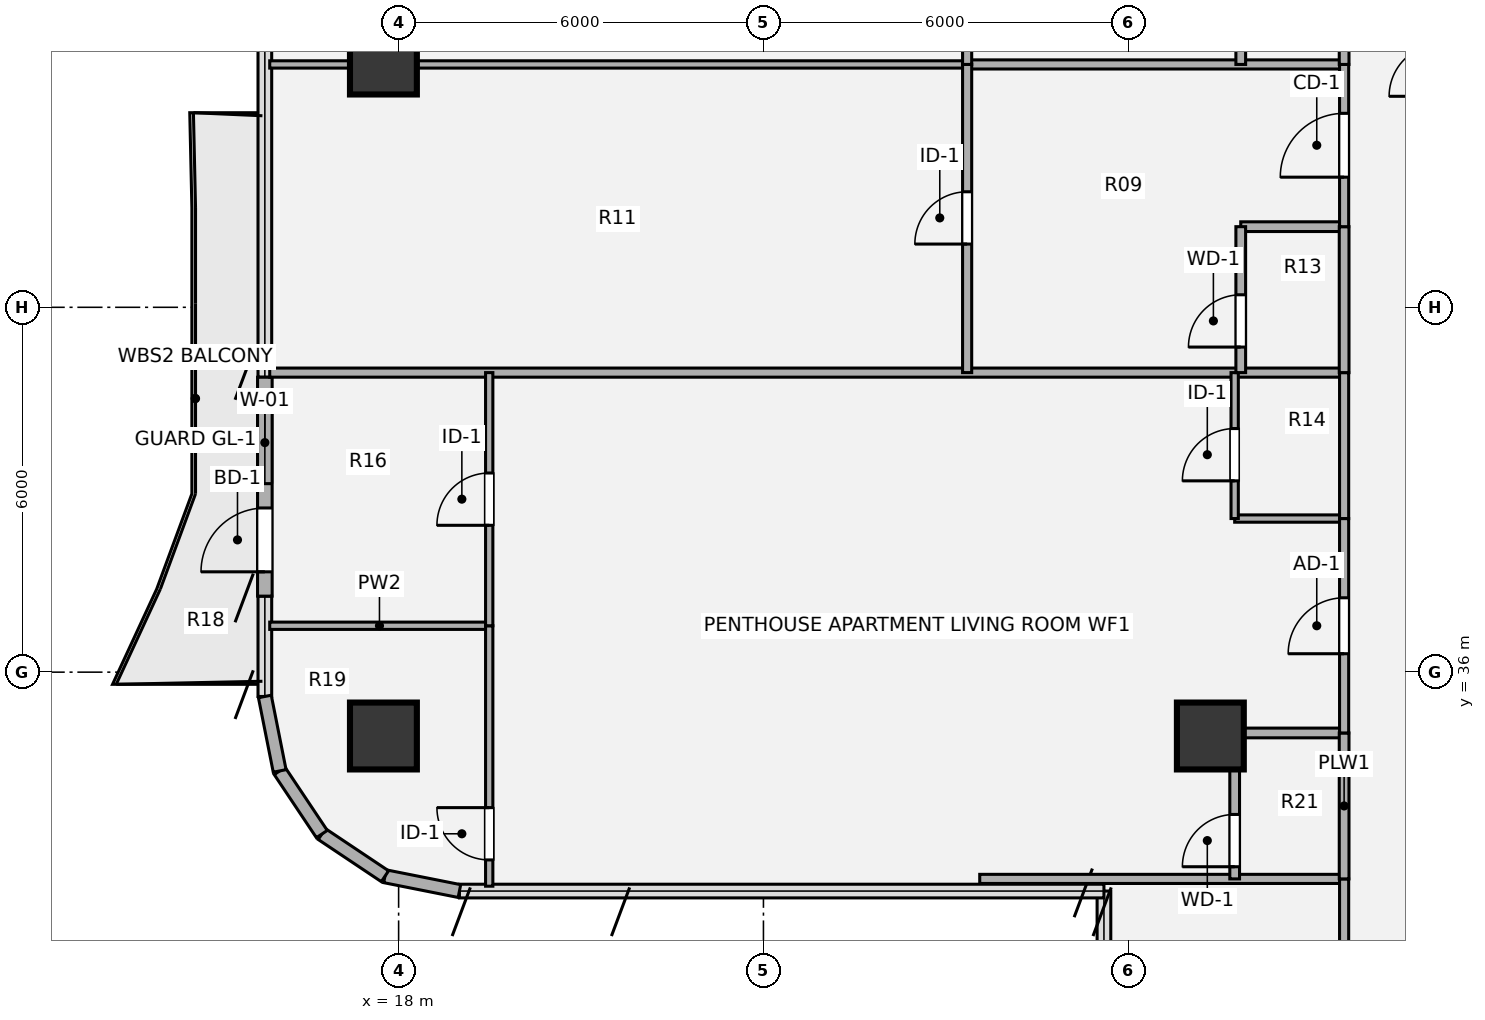
"""IFC4 building model, lengths in metres.
Left out: names, types, materials, properties, quantities, classifications, styles, units other than length and angle.
Written with IfcOpenShell. Run it as: python <this file> out.ifc"""

import sys

from ifc_helpers import new_model, si_unit, direction, frame, frame_2d, origin, origin_2d, place, context, subcontext, project, spatial, rectangle, hollow_circle, extrude, source, transform, mapped, element, fill, save


model = new_model("IFC4")
c1 = context("Model", 3, precision=1e-05, world=origin(), true_north=direction((0.0, 1.0)))
c2 = subcontext(c1, "Body", "Model", "MODEL_VIEW")
j1 = project(units=[si_unit("LENGTHUNIT", "METRE"), si_unit("PLANEANGLEUNIT", "RADIAN")], contexts=[c1])
p1 = place(None, origin())
s1 = spatial("IfcSite", under=j1, at=p1, CompositionType="ELEMENT")
p2 = place(p1, origin())
s2 = spatial("IfcBuilding", under=s1, at=p2, CompositionType="ELEMENT")
p3 = place(p2, frame((0.0, 0.0, 205.56)))
s3 = spatial("IfcBuildingStorey", under=s2, at=p3, CompositionType="ELEMENT", Elevation=205.56)
m1 = source(origin(), c2, "Body", "SweptSolid", [
    extrude(hollow_circle(Radius=0.55, WallThickness=0.04, at=origin_2d()), origin(), (0.0, 0.0, 1.0), 3.78),
])
for number, where, z_axis, x_axis in (
    (1, (17.75, 34.95, 0.0), (0.0, 0.0, 1.0), (1.0, 0.0, 0.0)),
    (2, (17.75, 46.05, 0.0), (0.0, 0.0, 1.0), (1.0, 0.0, 0.0)),
    (3, (31.35, 34.95, 0.0), (0.0, 0.0, 1.0), (1.0, 0.0, 0.0)),
):
    element("IfcColumn", number, at=place(p3, frame(where, z_axis=z_axis, x_axis=x_axis)), inside=s3, PredefinedType="COLUMN", context=c2, shape_type="MappedRepresentation", body=[
        mapped(m1, transform((0.0, 0.0, 0.0), x_axis=(1.0, 0.0, 0.0), y_axis=(0.0, 1.0, 0.0), z_axis=(0.0, 0.0, 1.0), scale=1.0)),
    ])
for number, where, z_axis, x_axis in (
    (4, (19.0, 32.4, 0.0), (0.0, 0.0, 1.0), (-0.981, 0.195, 0.0)),
    (5, (17.775, 32.644, 0.0), (0.0, 0.0, 1.0), (-0.831, 0.556, 0.0)),
    (6, (16.737, 33.337, 0.0), (0.0, 0.0, 1.0), (-0.556, 0.831, 0.0)),
    (7, (16.044, 34.375, 0.0), (0.0, 0.0, 1.0), (-0.195, 0.981, 0.0)),
):
    element("IfcWall", number, at=place(p3, frame(where, z_axis=z_axis, x_axis=x_axis)), inside=s3, PredefinedType="SOLIDWALL", context=c2, shape_type="SweptSolid", body=[
        extrude(rectangle(XDim=1.249, YDim=0.215, at=frame_2d((0.624, 0.0))), origin(), (0.0, 0.0, 1.0), 3.53),
    ])
p4 = place(p3, frame((15.8, 37.25, 0.0), z_axis=(0.0, 0.0, 1.0), x_axis=(0.0, 1.0, 0.0)))
e8 = element("IfcWall", 8, at=p4, inside=s3, PredefinedType="SOLIDWALL", context=c2, shape_type="SweptSolid", body=[
    extrude(rectangle(XDim=3.6, YDim=0.24, at=frame_2d((1.8, 0.0))), origin(), (0.0, 0.0, 1.0), 3.53),
])
p5 = place(p4, frame((0.4, 0.0, 0.0)))
e9 = element("IfcOpeningElement", 9, at=p5, cuts=e8, PredefinedType="OPENING", context=c2, shape_type="SweptSolid", body=[
    extrude(rectangle(XDim=1.05, YDim=2.15, at=origin_2d()), frame((0.525, 0.13, 1.075), z_axis=(0.0, -1.0, 0.0), x_axis=(1.0, 0.0, 0.0)), (0.0, 0.0, 1.0), 0.26),
])
p6 = place(p4, frame((1.85, 0.0, 0.85)))
e10 = element("IfcOpeningElement", 10, at=p6, cuts=e8, PredefinedType="OPENING", context=c2, shape_type="SweptSolid", body=[
    extrude(rectangle(XDim=1.35, YDim=1.35, at=origin_2d()), frame((0.675, 0.13, 0.675), z_axis=(0.0, -1.0, 0.0), x_axis=(1.0, 0.0, 0.0)), (0.0, 0.0, 1.0), 0.26),
])
p7 = place(p3, frame((27.557, 32.6, 0.0), z_axis=(0.0, 0.0, 1.0), x_axis=(1.0, 0.0, 0.0)))
e11 = element("IfcWall", 11, at=p7, inside=s3, PredefinedType="PARTITIONING", context=c2, shape_type="SweptSolid", body=[
    extrude(rectangle(XDim=5.993, YDim=0.15, at=frame_2d((2.997, 0.0))), origin(), (0.0, 0.0, 1.0), 3.5),
])
p8 = place(p3, frame((31.75, 35.0, 0.0), z_axis=(0.0, 0.0, 1.0), x_axis=(1.0, 0.0, 0.0)))
e12 = element("IfcWall", 12, at=p8, inside=s3, PredefinedType="PLUMBINGWALL", context=c2, shape_type="SweptSolid", body=[
    extrude(rectangle(XDim=1.8, YDim=0.16, at=frame_2d((0.9, 0.0))), origin(), (0.0, 0.0, 1.0), 2.903),
])
p9 = place(p3, frame((15.88, 36.763, 0.0), z_axis=(0.0, 0.0, 1.0), x_axis=(1.0, 0.0, 0.0)))
e13 = element("IfcWall", 13, at=p9, inside=s3, PredefinedType="PARTITIONING", context=c2, shape_type="SweptSolid", body=[
    extrude(rectangle(XDim=3.61, YDim=0.12, at=frame_2d((1.805, 0.0))), origin(), (0.0, 0.0, 1.0), 2.982),
])
p10 = place(p3, frame((31.75, 38.526, 0.0), z_axis=(0.0, 0.0, 1.0), x_axis=(1.0, 0.0, 0.0)))
e14 = element("IfcWall", 14, at=p10, inside=s3, PredefinedType="PARTITIONING", context=c2, shape_type="SweptSolid", body=[
    extrude(rectangle(XDim=1.8, YDim=0.12, at=frame_2d((0.9, 0.0))), origin(), (0.0, 0.0, 1.0), 3.259),
])
p11 = place(p3, frame((15.88, 40.926, 0.0), z_axis=(0.0, 0.0, 1.0), x_axis=(1.0, 0.0, 0.0)))
e15 = element("IfcWall", 15, at=p11, inside=s3, PredefinedType="PARTITIONING", context=c2, shape_type="SweptSolid", body=[
    extrude(rectangle(XDim=17.67, YDim=0.15, at=frame_2d((8.835, 0.0))), origin(), (0.0, 0.0, 1.0), 2.982),
])
p12 = place(p3, frame((31.85, 43.326, 0.0), z_axis=(0.0, 0.0, 1.0), x_axis=(1.0, 0.0, 0.0)))
e16 = element("IfcWall", 16, at=p12, inside=s3, PredefinedType="PLUMBINGWALL", context=c2, shape_type="SweptSolid", body=[
    extrude(rectangle(XDim=1.7, YDim=0.16, at=frame_2d((0.85, 0.0))), origin(), (0.0, 0.0, 1.0), 3.259),
])
p13 = place(p3, frame((15.88, 45.994, 0.0), z_axis=(0.0, 0.0, 1.0), x_axis=(1.0, 0.0, 0.0)))
e17 = element("IfcWall", 17, at=p13, inside=s3, PredefinedType="PARTITIONING", context=c2, shape_type="SweptSolid", body=[
    extrude(rectangle(XDim=11.47, YDim=0.12, at=frame_2d((5.735, 0.0))), origin(), (0.0, 0.0, 1.0), 2.903),
])
p14 = place(p3, frame((27.35, 45.994, 0.0), z_axis=(0.0, 0.0, 1.0), x_axis=(1.0, 0.0, 0.0)))
e18 = element("IfcWall", 18, at=p14, inside=s3, PredefinedType="PARTITIONING", context=c2, shape_type="SweptSolid", body=[
    extrude(rectangle(XDim=6.2, YDim=0.15, at=frame_2d((3.1, 0.0))), origin(), (0.0, 0.0, 1.0), 2.903),
])
p15 = place(p3, frame((19.49, 32.48, 0.0), z_axis=(0.0, 0.0, 1.0), x_axis=(0.0, 1.0, 0.0)))
e19 = element("IfcWall", 19, at=p15, inside=s3, PredefinedType="PARTITIONING", context=c2, shape_type="SweptSolid", body=[
    extrude(rectangle(XDim=4.283, YDim=0.12, at=frame_2d((2.142, 0.0))), origin(), (0.0, 0.0, 1.0), 3.5),
])
p16 = place(p15, frame((0.432, 0.0, 0.0)))
e20 = element("IfcOpeningElement", 20, at=p16, cuts=e19, PredefinedType="OPENING", context=c2, shape_type="SweptSolid", body=[
    extrude(rectangle(XDim=0.86, YDim=2.1, at=origin_2d()), frame((0.43, 0.07, 1.05), z_axis=(0.0, -1.0, 0.0), x_axis=(1.0, 0.0, 0.0)), (0.0, 0.0, 1.0), 0.14),
])
p17 = place(p3, frame((19.49, 36.763, 0.0), z_axis=(0.0, 0.0, 1.0), x_axis=(0.0, 1.0, 0.0)))
e21 = element("IfcWall", 21, at=p17, inside=s3, PredefinedType="PARTITIONING", context=c2, shape_type="SweptSolid", body=[
    extrude(rectangle(XDim=4.163, YDim=0.12, at=frame_2d((2.082, 0.0))), origin(), (0.0, 0.0, 1.0), 3.5),
])
p18 = place(p17, frame((1.652, 0.0, 0.0)))
e22 = element("IfcOpeningElement", 22, at=p18, cuts=e21, PredefinedType="OPENING", context=c2, shape_type="SweptSolid", body=[
    extrude(rectangle(XDim=0.86, YDim=2.1, at=origin_2d()), frame((0.43, 0.07, 1.05), z_axis=(0.0, -1.0, 0.0), x_axis=(1.0, 0.0, 0.0)), (0.0, 0.0, 1.0), 0.14),
])
p19 = place(p3, frame((27.35, 40.926, 0.0), z_axis=(0.0, 0.0, 1.0), x_axis=(0.0, 1.0, 0.0)))
e23 = element("IfcWall", 23, at=p19, inside=s3, PredefinedType="PARTITIONING", context=c2, shape_type="SweptSolid", body=[
    extrude(rectangle(XDim=5.068, YDim=0.15, at=frame_2d((2.534, 0.0))), origin(), (0.0, 0.0, 1.0), 3.5),
])
p20 = place(p19, frame((2.114, 0.0, 0.0)))
e24 = element("IfcOpeningElement", 24, at=p20, cuts=e23, PredefinedType="OPENING", context=c2, shape_type="SweptSolid", body=[
    extrude(rectangle(XDim=0.86, YDim=2.1, at=origin_2d()), frame((0.43, 0.085, 1.05), z_axis=(0.0, -1.0, 0.0), x_axis=(1.0, 0.0, 0.0)), (0.0, 0.0, 1.0), 0.17),
])
p21 = place(p3, frame((27.35, 45.994, 0.0), z_axis=(0.0, 0.0, 1.0), x_axis=(0.0, 1.0, 0.0)))
e25 = element("IfcWall", 25, at=p21, inside=s3, PredefinedType="PARTITIONING", context=c2, shape_type="SweptSolid", body=[
    extrude(rectangle(XDim=4.706, YDim=0.15, at=frame_2d((2.353, 0.0))), origin(), (0.0, 0.0, 1.0), 3.5),
])
p22 = place(p21, frame((1.546, 0.0, 0.0)))
e26 = element("IfcOpeningElement", 26, at=p22, cuts=e25, PredefinedType="OPENING", context=c2, shape_type="SweptSolid", body=[
    extrude(rectangle(XDim=0.86, YDim=2.1, at=origin_2d()), frame((0.43, 0.085, 1.05), z_axis=(0.0, -1.0, 0.0), x_axis=(1.0, 0.0, 0.0)), (0.0, 0.0, 1.0), 0.17),
])
p23 = place(p3, frame((31.75, 32.6, 0.0), z_axis=(0.0, 0.0, 1.0), x_axis=(0.0, 1.0, 0.0)))
e27 = element("IfcWall", 27, at=p23, inside=s3, PredefinedType="PLUMBINGWALL", context=c2, shape_type="SweptSolid", body=[
    extrude(rectangle(XDim=2.4, YDim=0.16, at=frame_2d((1.2, 0.0))), origin(), (0.0, 0.0, 1.0), 3.5),
])
p24 = place(p23, frame((0.2, 0.0, 0.0)))
e28 = element("IfcOpeningElement", 28, at=p24, cuts=e27, PredefinedType="OPENING", context=c2, shape_type="SweptSolid", body=[
    extrude(rectangle(XDim=0.86, YDim=2.1, at=origin_2d()), frame((0.43, 0.09, 1.05), z_axis=(0.0, -1.0, 0.0), x_axis=(1.0, 0.0, 0.0)), (0.0, 0.0, 1.0), 0.18),
])
p25 = place(p3, frame((31.75, 38.526, 0.0), z_axis=(0.0, 0.0, 1.0), x_axis=(0.0, 1.0, 0.0)))
e29 = element("IfcWall", 29, at=p25, inside=s3, PredefinedType="PARTITIONING", context=c2, shape_type="SweptSolid", body=[
    extrude(rectangle(XDim=2.4, YDim=0.12, at=frame_2d((1.2, 0.0))), origin(), (0.0, 0.0, 1.0), 3.5),
])
p26 = place(p25, frame((0.62, 0.0, 0.0)))
e30 = element("IfcOpeningElement", 30, at=p26, cuts=e29, PredefinedType="OPENING", context=c2, shape_type="SweptSolid", body=[
    extrude(rectangle(XDim=0.86, YDim=2.1, at=origin_2d()), frame((0.43, 0.07, 1.05), z_axis=(0.0, -1.0, 0.0), x_axis=(1.0, 0.0, 0.0)), (0.0, 0.0, 1.0), 0.14),
])
p27 = place(p3, frame((31.85, 40.926, 0.0), z_axis=(0.0, 0.0, 1.0), x_axis=(0.0, 1.0, 0.0)))
e31 = element("IfcWall", 31, at=p27, inside=s3, PredefinedType="PLUMBINGWALL", context=c2, shape_type="SweptSolid", body=[
    extrude(rectangle(XDim=2.4, YDim=0.16, at=frame_2d((1.2, 0.0))), origin(), (0.0, 0.0, 1.0), 3.5),
])
p28 = place(p27, frame((0.42, 0.0, 0.0)))
e32 = element("IfcOpeningElement", 32, at=p28, cuts=e31, PredefinedType="OPENING", context=c2, shape_type="SweptSolid", body=[
    extrude(rectangle(XDim=0.86, YDim=2.1, at=origin_2d()), frame((0.43, 0.09, 1.05), z_axis=(0.0, -1.0, 0.0), x_axis=(1.0, 0.0, 0.0)), (0.0, 0.0, 1.0), 0.18),
])
p29 = place(p3, frame((31.85, 45.994, 0.0), z_axis=(0.0, 0.0, 1.0), x_axis=(0.0, 1.0, 0.0)))
e33 = element("IfcWall", 33, at=p29, inside=s3, PredefinedType="PLUMBINGWALL", context=c2, shape_type="SweptSolid", body=[
    extrude(rectangle(XDim=2.4, YDim=0.16, at=frame_2d((1.2, 0.0))), origin(), (0.0, 0.0, 1.0), 3.5),
])
p30 = place(p29, frame((0.42, 0.0, 0.0)))
e34 = element("IfcOpeningElement", 34, at=p30, cuts=e33, PredefinedType="OPENING", context=c2, shape_type="SweptSolid", body=[
    extrude(rectangle(XDim=0.86, YDim=2.1, at=origin_2d()), frame((0.43, 0.09, 1.05), z_axis=(0.0, -1.0, 0.0), x_axis=(1.0, 0.0, 0.0)), (0.0, 0.0, 1.0), 0.18),
])
p31 = place(p3, frame((33.55, 22.8, 0.0), z_axis=(0.0, 0.0, 1.0), x_axis=(0.0, 1.0, 0.0)))
e35 = element("IfcWall", 35, at=p31, inside=s3, PredefinedType="PARTITIONING", context=c2, shape_type="SweptSolid", body=[
    extrude(rectangle(XDim=9.8, YDim=0.15, at=frame_2d((4.9, 0.0))), origin(), (0.0, 0.0, 1.0), 3.5),
])
p32 = place(p31, frame((4.34, 0.0, 0.0)))
e36 = element("IfcOpeningElement", 36, at=p32, cuts=e35, PredefinedType="OPENING", context=c2, shape_type="SweptSolid", body=[
    extrude(rectangle(XDim=0.86, YDim=2.1, at=origin_2d()), frame((0.43, 0.085, 1.05), z_axis=(0.0, -1.0, 0.0), x_axis=(1.0, 0.0, 0.0)), (0.0, 0.0, 1.0), 0.17),
])
p33 = place(p3, frame((33.55, 32.6, 0.0), z_axis=(0.0, 0.0, 1.0), x_axis=(0.0, 1.0, 0.0)))
e37 = element("IfcWall", 37, at=p33, inside=s3, PredefinedType="PLUMBINGWALL", context=c2, shape_type="SweptSolid", body=[
    extrude(rectangle(XDim=2.4, YDim=0.16, at=frame_2d((1.2, 0.0))), origin(), (0.0, 0.0, 1.0), 3.5),
])
p34 = place(p3, frame((33.55, 35.0, 0.0), z_axis=(0.0, 0.0, 1.0), x_axis=(0.0, 1.0, 0.0)))
e38 = element("IfcWall", 38, at=p34, inside=s3, PredefinedType="PARTITIONING", context=c2, shape_type="SweptSolid", body=[
    extrude(rectangle(XDim=3.526, YDim=0.15, at=frame_2d((1.763, 0.0))), origin(), (0.0, 0.0, 1.0), 3.5),
])
p35 = place(p34, frame((1.303, 0.0, 0.0)))
e39 = element("IfcOpeningElement", 39, at=p35, cuts=e38, PredefinedType="OPENING", context=c2, shape_type="SweptSolid", body=[
    extrude(rectangle(XDim=0.92, YDim=2.1, at=origin_2d()), frame((0.46, 0.085, 1.05), z_axis=(0.0, -1.0, 0.0), x_axis=(1.0, 0.0, 0.0)), (0.0, 0.0, 1.0), 0.17),
])
p36 = place(p3, frame((33.55, 38.526, 0.0), z_axis=(0.0, 0.0, 1.0), x_axis=(0.0, 1.0, 0.0)))
e40 = element("IfcWall", 40, at=p36, inside=s3, PredefinedType="PARTITIONING", context=c2, shape_type="SweptSolid", body=[
    extrude(rectangle(XDim=2.4, YDim=0.15, at=frame_2d((1.2, 0.0))), origin(), (0.0, 0.0, 1.0), 3.5),
])
p37 = place(p3, frame((33.55, 40.926, 0.0), z_axis=(0.0, 0.0, 1.0), x_axis=(0.0, 1.0, 0.0)))
e41 = element("IfcWall", 41, at=p37, inside=s3, PredefinedType="PLUMBINGWALL", context=c2, shape_type="SweptSolid", body=[
    extrude(rectangle(XDim=2.4, YDim=0.16, at=frame_2d((1.2, 0.0))), origin(), (0.0, 0.0, 1.0), 3.5),
])
p38 = place(p3, frame((33.55, 43.326, 0.0), z_axis=(0.0, 0.0, 1.0), x_axis=(0.0, 1.0, 0.0)))
e42 = element("IfcWall", 42, at=p38, inside=s3, PredefinedType="PARTITIONING", context=c2, shape_type="SweptSolid", body=[
    extrude(rectangle(XDim=2.668, YDim=0.15, at=frame_2d((1.334, 0.0))), origin(), (0.0, 0.0, 1.0), 3.5),
])
p39 = place(p38, frame((0.814, 0.0, 0.0)))
e43 = element("IfcOpeningElement", 43, at=p39, cuts=e42, PredefinedType="OPENING", context=c2, shape_type="SweptSolid", body=[
    extrude(rectangle(XDim=1.05, YDim=2.1, at=origin_2d()), frame((0.525, 0.085, 1.05), z_axis=(0.0, -1.0, 0.0), x_axis=(1.0, 0.0, 0.0)), (0.0, 0.0, 1.0), 0.17),
])
p40 = place(p3, frame((33.55, 45.994, 0.0), z_axis=(0.0, 0.0, 1.0), x_axis=(0.0, 1.0, 0.0)))
e44 = element("IfcWall", 44, at=p40, inside=s3, PredefinedType="PLUMBINGWALL", context=c2, shape_type="SweptSolid", body=[
    extrude(rectangle(XDim=2.4, YDim=0.16, at=frame_2d((1.2, 0.0))), origin(), (0.0, 0.0, 1.0), 3.5),
])
m2 = source(origin(), c2, "Body", "SweptSolid", [
    extrude(rectangle(XDim=1.05, YDim=2.15, at=origin_2d()), frame((0.525, 0.025, 1.075), z_axis=(0.0, -1.0, 0.0), x_axis=(1.0, 0.0, 0.0)), (0.0, 0.0, 1.0), 0.05),
])
p41 = place(p5, origin())
e45 = element("IfcDoor", 45, at=p41, inside=s3, OperationType="SINGLE_SWING_LEFT", PredefinedType="DOOR", context=c2, shape_type="MappedRepresentation", body=[
    mapped(m2, transform((0.0, 0.0, 0.0), x_axis=(1.0, 0.0, 0.0), y_axis=(0.0, 1.0, 0.0), z_axis=(0.0, 0.0, 1.0), scale=1.0)),
])
fill(e9, e45)
m3 = source(origin(), c2, "Body", "SweptSolid", [
    extrude(rectangle(XDim=1.35, YDim=1.35, at=origin_2d()), frame((0.675, 0.03, 0.675), z_axis=(0.0, -1.0, 0.0), x_axis=(1.0, 0.0, 0.0)), (0.0, 0.0, 1.0), 0.06),
])
p42 = place(p6, origin())
e46 = element("IfcWindow", 46, at=p42, inside=s3, PartitioningType="SINGLE_PANEL", PredefinedType="WINDOW", context=c2, shape_type="MappedRepresentation", body=[
    mapped(m3, transform((0.0, 0.0, 0.0), x_axis=(1.0, 0.0, 0.0), y_axis=(0.0, 1.0, 0.0), z_axis=(0.0, 0.0, 1.0), scale=1.0)),
])
fill(e10, e46)
m4 = source(origin(), c2, "Body", "SweptSolid", [
    extrude(rectangle(XDim=0.86, YDim=2.1, at=origin_2d()), frame((0.43, 0.025, 1.05), z_axis=(0.0, -1.0, 0.0), x_axis=(1.0, 0.0, 0.0)), (0.0, 0.0, 1.0), 0.05),
])
p43 = place(p16, origin())
e47 = element("IfcDoor", 47, at=p43, inside=s3, OperationType="SINGLE_SWING_RIGHT", PredefinedType="DOOR", context=c2, shape_type="MappedRepresentation", body=[
    mapped(m4, transform((0.0, 0.0, 0.0), x_axis=(1.0, 0.0, 0.0), y_axis=(0.0, 1.0, 0.0), z_axis=(0.0, 0.0, 1.0), scale=1.0)),
])
fill(e20, e47)
p44 = place(p18, origin())
e48 = element("IfcDoor", 48, at=p44, inside=s3, OperationType="SINGLE_SWING_LEFT", PredefinedType="DOOR", context=c2, shape_type="MappedRepresentation", body=[
    mapped(m4, transform((0.0, 0.0, 0.0), x_axis=(1.0, 0.0, 0.0), y_axis=(0.0, 1.0, 0.0), z_axis=(0.0, 0.0, 1.0), scale=1.0)),
])
fill(e22, e48)
p45 = place(p20, origin())
e49 = element("IfcDoor", 49, at=p45, inside=s3, OperationType="SINGLE_SWING_LEFT", PredefinedType="DOOR", context=c2, shape_type="MappedRepresentation", body=[
    mapped(m4, transform((0.0, 0.0, 0.0), x_axis=(1.0, 0.0, 0.0), y_axis=(0.0, 1.0, 0.0), z_axis=(0.0, 0.0, 1.0), scale=1.0)),
])
fill(e24, e49)
m5 = source(origin(), c2, "Body", "SweptSolid", [
    extrude(rectangle(XDim=0.86, YDim=2.1, at=origin_2d()), frame((0.43, 0.025, 1.05), z_axis=(0.0, -1.0, 0.0), x_axis=(1.0, 0.0, 0.0)), (0.0, 0.0, 1.0), 0.05),
])
p46 = place(p24, origin())
e50 = element("IfcDoor", 50, at=p46, inside=s3, OperationType="SINGLE_SWING_LEFT", PredefinedType="DOOR", context=c2, shape_type="MappedRepresentation", body=[
    mapped(m5, transform((0.0, 0.0, 0.0), x_axis=(1.0, 0.0, 0.0), y_axis=(0.0, 1.0, 0.0), z_axis=(0.0, 0.0, 1.0), scale=1.0)),
])
fill(e28, e50)
p47 = place(p26, origin())
e51 = element("IfcDoor", 51, at=p47, inside=s3, OperationType="SINGLE_SWING_LEFT", PredefinedType="DOOR", context=c2, shape_type="MappedRepresentation", body=[
    mapped(m4, transform((0.0, 0.0, 0.0), x_axis=(1.0, 0.0, 0.0), y_axis=(0.0, 1.0, 0.0), z_axis=(0.0, 0.0, 1.0), scale=1.0)),
])
fill(e30, e51)
p48 = place(p28, origin())
e52 = element("IfcDoor", 52, at=p48, inside=s3, OperationType="SINGLE_SWING_LEFT", PredefinedType="DOOR", context=c2, shape_type="MappedRepresentation", body=[
    mapped(m5, transform((0.0, 0.0, 0.0), x_axis=(1.0, 0.0, 0.0), y_axis=(0.0, 1.0, 0.0), z_axis=(0.0, 0.0, 1.0), scale=1.0)),
])
fill(e32, e52)
m6 = source(origin(), c2, "Body", "SweptSolid", [
    extrude(rectangle(XDim=0.92, YDim=2.1, at=origin_2d()), frame((0.46, 0.025, 1.05), z_axis=(0.0, -1.0, 0.0), x_axis=(1.0, 0.0, 0.0)), (0.0, 0.0, 1.0), 0.05),
])
p49 = place(p35, origin())
e53 = element("IfcDoor", 53, at=p49, inside=s3, OperationType="SINGLE_SWING_LEFT", PredefinedType="DOOR", context=c2, shape_type="MappedRepresentation", body=[
    mapped(m6, transform((0.0, 0.0, 0.0), x_axis=(1.0, 0.0, 0.0), y_axis=(0.0, 1.0, 0.0), z_axis=(0.0, 0.0, 1.0), scale=1.0)),
])
fill(e39, e53)
m7 = source(origin(), c2, "Body", "SweptSolid", [
    extrude(rectangle(XDim=1.05, YDim=2.1, at=origin_2d()), frame((0.525, 0.025, 1.05), z_axis=(0.0, -1.0, 0.0), x_axis=(1.0, 0.0, 0.0)), (0.0, 0.0, 1.0), 0.05),
])
p50 = place(p39, origin())
e54 = element("IfcDoor", 54, at=p50, inside=s3, OperationType="SINGLE_SWING_LEFT", PredefinedType="DOOR", context=c2, shape_type="MappedRepresentation", body=[
    mapped(m7, transform((0.0, 0.0, 0.0), x_axis=(1.0, 0.0, 0.0), y_axis=(0.0, 1.0, 0.0), z_axis=(0.0, 0.0, 1.0), scale=1.0)),
])
fill(e43, e54)
save(model, sys.argv[1])
